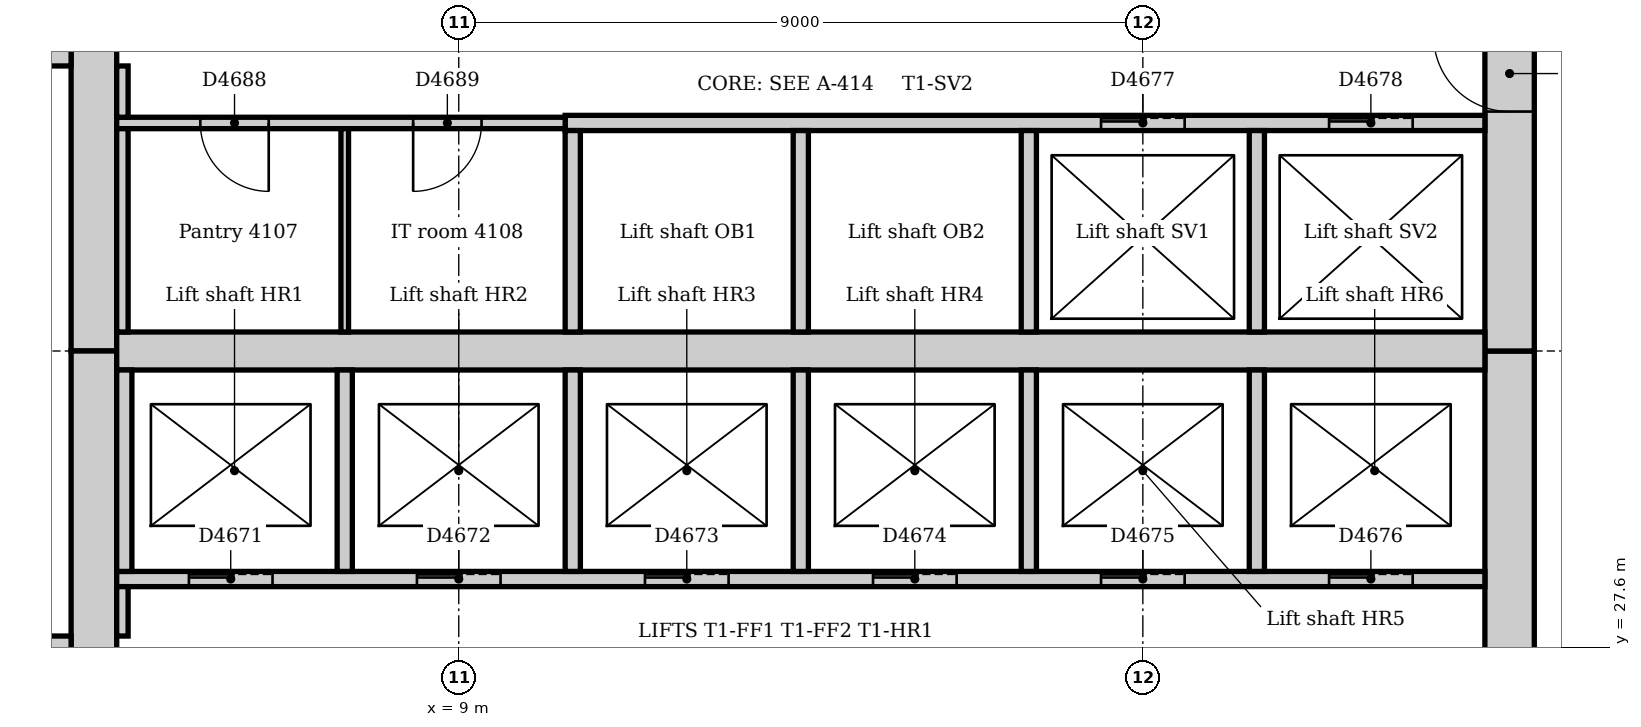
"""IFC4 building model, lengths in metres.
Left out: names, types, materials, properties, quantities, classifications, styles, units other than length and angle.
Written with IfcOpenShell. Run it as: python <this file> out.ifc"""

import sys

from ifc_helpers import new_model, si_unit, direction, frame, frame_2d, origin, place, context, subcontext, project, spatial, rectangle, extrude, element, fill, save


model = new_model("IFC4")
c1 = context("Model", 3, precision=1e-05, world=origin(), true_north=direction((0.0, 1.0)))
c2 = subcontext(c1, "Body", "Model", "MODEL_VIEW")
j1 = project(units=[si_unit("LENGTHUNIT", "METRE"), si_unit("PLANEANGLEUNIT", "RADIAN")], contexts=[c1])
p1 = place(None, origin())
s1 = spatial("IfcSite", under=j1, at=p1, CompositionType="ELEMENT")
p2 = place(p1, origin())
s2 = spatial("IfcBuilding", under=s1, at=p2, CompositionType="ELEMENT")
p3 = place(p2, frame((0.0, 0.0, 173.0)))
s3 = spatial("IfcBuildingStorey", under=s2, at=p3, CompositionType="ELEMENT", Elevation=173.0)
p4 = place(p3, frame((22.825, 21.0, 0.0), z_axis=(0.0, 0.0, 1.0), x_axis=(0.0, 1.0, 0.0)))
e1 = element("IfcWall", 1, at=p4, inside=s3, PredefinedType="SOLIDWALL", context=c2, shape_type="SweptSolid", body=[
    extrude(rectangle(XDim=10.5, YDim=0.65, at=frame_2d((5.25, 0.0))), origin(), (0.0, 0.0, 1.0), 4.0),
])
p5 = place(p4, frame((4.35, 0.0, 0.0)))
e2 = element("IfcOpeningElement", 2, at=p5, cuts=e1, PredefinedType="OPENING", context=c2, shape_type="SweptSolid", body=[
    extrude(rectangle(XDim=1.8, YDim=2.1, at=frame_2d((0.9, 1.05))), frame((0.0, 0.335, 0.0), z_axis=(0.0, -1.0, 0.0), x_axis=(1.0, 0.0, 0.0)), (0.0, 0.0, 1.0), 0.67),
])
p6 = place(p3, frame((22.825, 31.5, 0.0), z_axis=(0.0, 0.0, 1.0), x_axis=(0.0, 1.0, 0.0)))
e3 = element("IfcWall", 3, at=p6, inside=s3, PredefinedType="SOLIDWALL", context=c2, shape_type="SweptSolid", body=[
    extrude(rectangle(XDim=10.5, YDim=0.65, at=frame_2d((5.25, 0.0))), origin(), (0.0, 0.0, 1.0), 4.0),
])
p7 = place(p6, frame((3.15, 0.0, 0.0)))
e4 = element("IfcOpeningElement", 4, at=p7, cuts=e3, PredefinedType="OPENING", context=c2, shape_type="SweptSolid", body=[
    extrude(rectangle(XDim=1.0, YDim=2.1, at=frame_2d((0.5, 1.05))), frame((0.0, 0.335, 0.0), z_axis=(0.0, -1.0, 0.0), x_axis=(1.0, 0.0, 0.0)), (0.0, 0.0, 1.0), 0.67),
])
p8 = place(p6, frame((5.2, 0.0, 0.0)))
e5 = element("IfcOpeningElement", 5, at=p8, cuts=e3, PredefinedType="OPENING", context=c2, shape_type="SweptSolid", body=[
    extrude(rectangle(XDim=1.0, YDim=2.1, at=frame_2d((0.5, 1.05))), frame((0.0, 0.335, 0.0), z_axis=(0.0, -1.0, 0.0), x_axis=(1.0, 0.0, 0.0)), (0.0, 0.0, 1.0), 0.67),
])
p9 = place(p3, frame((4.2, 42.0, 0.0), z_axis=(0.0, 0.0, 1.0), x_axis=(0.0, -1.0, 0.0)))
e6 = element("IfcWall", 6, at=p9, inside=s3, PredefinedType="SOLIDWALL", context=c2, shape_type="SweptSolid", body=[
    extrude(rectangle(XDim=10.5, YDim=0.6, at=frame_2d((5.25, 0.0))), origin(), (0.0, 0.0, 1.0), 4.0),
])
p10 = place(p9, frame((5.3, 0.0, 0.0)))
e7 = element("IfcOpeningElement", 7, at=p10, cuts=e6, PredefinedType="OPENING", context=c2, shape_type="SweptSolid", body=[
    extrude(rectangle(XDim=1.0, YDim=2.1, at=frame_2d((0.5, 1.05))), frame((0.0, 0.31, 0.0), z_axis=(0.0, -1.0, 0.0), x_axis=(1.0, 0.0, 0.0)), (0.0, 0.0, 1.0), 0.62),
])
p11 = place(p3, frame((4.2, 31.5, 0.0), z_axis=(0.0, 0.0, 1.0), x_axis=(0.0, -1.0, 0.0)))
e8 = element("IfcWall", 8, at=p11, inside=s3, PredefinedType="SOLIDWALL", context=c2, shape_type="SweptSolid", body=[
    extrude(rectangle(XDim=10.5, YDim=0.6, at=frame_2d((5.25, 0.0))), origin(), (0.0, 0.0, 1.0), 4.0),
])
p12 = place(p11, frame((4.25, 0.0, 0.0)))
e9 = element("IfcOpeningElement", 9, at=p12, cuts=e8, PredefinedType="OPENING", context=c2, shape_type="SweptSolid", body=[
    extrude(rectangle(XDim=1.0, YDim=2.1, at=frame_2d((0.5, 1.05))), frame((0.0, 0.31, 0.0), z_axis=(0.0, -1.0, 0.0), x_axis=(1.0, 0.0, 0.0)), (0.0, 0.0, 1.0), 0.62),
])
p13 = place(p3, frame((4.5, 31.5, 0.0), z_axis=(0.0, 0.0, 1.0), x_axis=(1.0, 0.0, 0.0)))
e10 = element("IfcWall", 10, at=p13, inside=s3, PredefinedType="SOLIDWALL", context=c2, shape_type="SweptSolid", body=[
    extrude(rectangle(XDim=18.0, YDim=0.5, at=frame_2d((9.0, 0.0))), origin(), (0.0, 0.0, 1.0), 4.0),
])
p14 = place(p3, frame((3.9, 27.625, 0.0), z_axis=(0.0, 0.0, 1.0), x_axis=(-1.0, 0.0, 0.0)))
e11 = element("IfcWall", 11, at=p14, inside=s3, PredefinedType="SOLIDWALL", context=c2, shape_type="SweptSolid", body=[
    extrude(rectangle(XDim=3.54, YDim=0.25, at=frame_2d((1.77, 0.0))), origin(), (0.0, 0.0, 1.0), 4.0),
])
p15 = place(p14, frame((0.4, 0.0, 0.0)))
e12 = element("IfcOpeningElement", 12, at=p15, cuts=e11, PredefinedType="OPENING", context=c2, shape_type="SweptSolid", body=[
    extrude(rectangle(XDim=1.0, YDim=2.1, at=frame_2d((0.5, 1.05))), frame((0.0, 0.135, 0.0), z_axis=(0.0, -1.0, 0.0), x_axis=(1.0, 0.0, 0.0)), (0.0, 0.0, 1.0), 0.27),
])
p16 = place(p3, frame((0.36, 35.375, 0.0), z_axis=(0.0, 0.0, 1.0), x_axis=(1.0, 0.0, 0.0)))
e13 = element("IfcWall", 13, at=p16, inside=s3, PredefinedType="SOLIDWALL", context=c2, shape_type="SweptSolid", body=[
    extrude(rectangle(XDim=3.54, YDim=0.25, at=frame_2d((1.77, 0.0))), origin(), (0.0, 0.0, 1.0), 4.0),
])
p17 = place(p16, frame((2.14, 0.0, 0.0)))
e14 = element("IfcOpeningElement", 14, at=p17, cuts=e13, PredefinedType="OPENING", context=c2, shape_type="SweptSolid", body=[
    extrude(rectangle(XDim=1.0, YDim=2.1, at=frame_2d((0.5, 1.05))), frame((0.0, 0.135, 0.0), z_axis=(0.0, -1.0, 0.0), x_axis=(1.0, 0.0, 0.0)), (0.0, 0.0, 1.0), 0.27),
])
p18 = place(p3, frame((4.5, 28.5, 0.0), z_axis=(0.0, 0.0, 1.0), x_axis=(1.0, 0.0, 0.0)))
e15 = element("IfcWall", 15, at=p18, inside=s3, PredefinedType="PARTITIONING", context=c2, shape_type="SweptSolid", body=[
    extrude(rectangle(XDim=18.0, YDim=0.2, at=frame_2d((9.0, 0.0))), origin(), (0.0, 0.0, 1.0), 3.85),
])
p19 = place(p18, frame((0.95, 0.0, 0.0)))
e16 = element("IfcOpeningElement", 16, at=p19, cuts=e15, PredefinedType="OPENING", context=c2, shape_type="SweptSolid", body=[
    extrude(rectangle(XDim=1.1, YDim=2.1, at=frame_2d((0.55, 1.05))), frame((0.0, 0.11, 0.0), z_axis=(0.0, -1.0, 0.0), x_axis=(1.0, 0.0, 0.0)), (0.0, 0.0, 1.0), 0.22),
])
p20 = place(p18, frame((3.95, 0.0, 0.0)))
e17 = element("IfcOpeningElement", 17, at=p20, cuts=e15, PredefinedType="OPENING", context=c2, shape_type="SweptSolid", body=[
    extrude(rectangle(XDim=1.1, YDim=2.1, at=frame_2d((0.55, 1.05))), frame((0.0, 0.11, 0.0), z_axis=(0.0, -1.0, 0.0), x_axis=(1.0, 0.0, 0.0)), (0.0, 0.0, 1.0), 0.22),
])
p21 = place(p18, frame((6.95, 0.0, 0.0)))
e18 = element("IfcOpeningElement", 18, at=p21, cuts=e15, PredefinedType="OPENING", context=c2, shape_type="SweptSolid", body=[
    extrude(rectangle(XDim=1.1, YDim=2.1, at=frame_2d((0.55, 1.05))), frame((0.0, 0.11, 0.0), z_axis=(0.0, -1.0, 0.0), x_axis=(1.0, 0.0, 0.0)), (0.0, 0.0, 1.0), 0.22),
])
p22 = place(p18, frame((9.95, 0.0, 0.0)))
e19 = element("IfcOpeningElement", 19, at=p22, cuts=e15, PredefinedType="OPENING", context=c2, shape_type="SweptSolid", body=[
    extrude(rectangle(XDim=1.1, YDim=2.1, at=frame_2d((0.55, 1.05))), frame((0.0, 0.11, 0.0), z_axis=(0.0, -1.0, 0.0), x_axis=(1.0, 0.0, 0.0)), (0.0, 0.0, 1.0), 0.22),
])
p23 = place(p18, frame((12.95, 0.0, 0.0)))
e20 = element("IfcOpeningElement", 20, at=p23, cuts=e15, PredefinedType="OPENING", context=c2, shape_type="SweptSolid", body=[
    extrude(rectangle(XDim=1.1, YDim=2.1, at=frame_2d((0.55, 1.05))), frame((0.0, 0.11, 0.0), z_axis=(0.0, -1.0, 0.0), x_axis=(1.0, 0.0, 0.0)), (0.0, 0.0, 1.0), 0.22),
])
p24 = place(p18, frame((15.95, 0.0, 0.0)))
e21 = element("IfcOpeningElement", 21, at=p24, cuts=e15, PredefinedType="OPENING", context=c2, shape_type="SweptSolid", body=[
    extrude(rectangle(XDim=1.1, YDim=2.1, at=frame_2d((0.55, 1.05))), frame((0.0, 0.11, 0.0), z_axis=(0.0, -1.0, 0.0), x_axis=(1.0, 0.0, 0.0)), (0.0, 0.0, 1.0), 0.22),
])
p25 = place(p3, frame((10.4, 34.5, 0.0), z_axis=(0.0, 0.0, 1.0), x_axis=(1.0, 0.0, 0.0)))
e22 = element("IfcWall", 22, at=p25, inside=s3, PredefinedType="PARTITIONING", context=c2, shape_type="SweptSolid", body=[
    extrude(rectangle(XDim=12.1, YDim=0.2, at=frame_2d((6.05, 0.0))), origin(), (0.0, 0.0, 1.0), 3.85),
])
p26 = place(p25, frame((7.05, 0.0, 0.0)))
e23 = element("IfcOpeningElement", 23, at=p26, cuts=e22, PredefinedType="OPENING", context=c2, shape_type="SweptSolid", body=[
    extrude(rectangle(XDim=1.1, YDim=2.1, at=frame_2d((0.55, 1.05))), frame((0.0, 0.11, 0.0), z_axis=(0.0, -1.0, 0.0), x_axis=(1.0, 0.0, 0.0)), (0.0, 0.0, 1.0), 0.22),
])
p27 = place(p25, frame((10.05, 0.0, 0.0)))
e24 = element("IfcOpeningElement", 24, at=p27, cuts=e22, PredefinedType="OPENING", context=c2, shape_type="SweptSolid", body=[
    extrude(rectangle(XDim=1.1, YDim=2.1, at=frame_2d((0.55, 1.05))), frame((0.0, 0.11, 0.0), z_axis=(0.0, -1.0, 0.0), x_axis=(1.0, 0.0, 0.0)), (0.0, 0.0, 1.0), 0.22),
])
for number, where, z_axis, x_axis in (
    (25, (10.5, 28.6, 0.0), (0.0, 0.0, 1.0), (0.0, 1.0, 0.0)),
    (26, (10.5, 31.75, 0.0), (0.0, 0.0, 1.0), (0.0, 1.0, 0.0)),
    (27, (13.5, 28.6, 0.0), (0.0, 0.0, 1.0), (0.0, 1.0, 0.0)),
    (28, (13.5, 31.75, 0.0), (0.0, 0.0, 1.0), (0.0, 1.0, 0.0)),
    (29, (16.5, 28.6, 0.0), (0.0, 0.0, 1.0), (0.0, 1.0, 0.0)),
    (30, (16.5, 31.75, 0.0), (0.0, 0.0, 1.0), (0.0, 1.0, 0.0)),
    (31, (19.5, 28.6, 0.0), (0.0, 0.0, 1.0), (0.0, 1.0, 0.0)),
    (32, (19.5, 31.75, 0.0), (0.0, 0.0, 1.0), (0.0, 1.0, 0.0)),
    (33, (4.6, 28.6, 0.0), (0.0, 0.0, 1.0), (0.0, 1.0, 0.0)),
    (34, (7.5, 28.6, 0.0), (0.0, 0.0, 1.0), (0.0, 1.0, 0.0)),
):
    element("IfcWall", number, at=place(p3, frame(where, z_axis=z_axis, x_axis=x_axis)), inside=s3, PredefinedType="PARTITIONING", context=c2, shape_type="SweptSolid", body=[
        extrude(rectangle(XDim=2.65, YDim=0.2, at=frame_2d((1.325, 0.0))), origin(), (0.0, 0.0, 1.0), 3.85),
    ])
p28 = place(p3, frame((4.5, 34.5, 0.0), z_axis=(0.0, 0.0, 1.0), x_axis=(1.0, 0.0, 0.0)))
e35 = element("IfcWall", 35, at=p28, inside=s3, PredefinedType="PARTITIONING", context=c2, shape_type="SweptSolid", body=[
    extrude(rectangle(XDim=5.9, YDim=0.15, at=frame_2d((2.95, 0.0))), origin(), (0.0, 0.0, 1.0), 3.85),
])
p29 = place(p28, frame((1.1, 0.0, 0.0)))
e36 = element("IfcOpeningElement", 36, at=p29, cuts=e35, PredefinedType="OPENING", context=c2, shape_type="SweptSolid", body=[
    extrude(rectangle(XDim=0.9, YDim=2.1, at=frame_2d((0.45, 1.05))), frame((0.0, 0.085, 0.0), z_axis=(0.0, -1.0, 0.0), x_axis=(1.0, 0.0, 0.0)), (0.0, 0.0, 1.0), 0.17),
])
p30 = place(p28, frame((3.9, 0.0, 0.0)))
e37 = element("IfcOpeningElement", 37, at=p30, cuts=e35, PredefinedType="OPENING", context=c2, shape_type="SweptSolid", body=[
    extrude(rectangle(XDim=0.9, YDim=2.1, at=frame_2d((0.45, 1.05))), frame((0.0, 0.085, 0.0), z_axis=(0.0, -1.0, 0.0), x_axis=(1.0, 0.0, 0.0)), (0.0, 0.0, 1.0), 0.17),
])
p31 = place(p3, frame((4.575, 34.575, 0.0), z_axis=(0.0, 0.0, 1.0), x_axis=(0.0, 1.0, 0.0)))
e38 = element("IfcWall", 38, at=p31, inside=s3, PredefinedType="PARTITIONING", context=c2, shape_type="SweptSolid", body=[
    extrude(rectangle(XDim=0.675, YDim=0.15, at=frame_2d((0.338, 0.0))), origin(), (0.0, 0.0, 1.0), 3.85),
])
p32 = place(p3, frame((4.575, 31.75, 0.0), z_axis=(0.0, 0.0, 1.0), x_axis=(0.0, 1.0, 0.0)))
e39 = element("IfcWall", 39, at=p32, inside=s3, PredefinedType="PARTITIONING", context=c2, shape_type="SweptSolid", body=[
    extrude(rectangle(XDim=2.675, YDim=0.15, at=frame_2d((1.337, 0.0))), origin(), (0.0, 0.0, 1.0), 3.85),
])
p33 = place(p3, frame((4.575, 27.75, 0.0), z_axis=(0.0, 0.0, 1.0), x_axis=(0.0, 1.0, 0.0)))
e40 = element("IfcWall", 40, at=p33, inside=s3, PredefinedType="PARTITIONING", context=c2, shape_type="SweptSolid", body=[
    extrude(rectangle(XDim=0.65, YDim=0.15, at=frame_2d((0.325, 0.0))), origin(), (0.0, 0.0, 1.0), 3.85),
])
p34 = place(p3, frame((7.5, 31.75, 0.0), z_axis=(0.0, 0.0, 1.0), x_axis=(0.0, 1.0, 0.0)))
e41 = element("IfcWall", 41, at=p34, inside=s3, PredefinedType="PARTITIONING", context=c2, shape_type="SweptSolid", body=[
    extrude(rectangle(XDim=2.675, YDim=0.1, at=frame_2d((1.337, 0.0))), origin(), (0.0, 0.0, 1.0), 3.85),
])
p35 = place(p19, origin())
e42 = element("IfcDoor", 42, at=p35, inside=s3, OperationType="SLIDING_TO_LEFT", PredefinedType="DOOR", context=c2, shape_type="SweptSolid", body=[
    extrude(rectangle(XDim=1.1, YDim=2.1, at=frame_2d((0.55, 1.05))), frame((0.0, 0.025, 0.0), z_axis=(0.0, -1.0, 0.0), x_axis=(1.0, 0.0, 0.0)), (0.0, 0.0, 1.0), 0.05),
])
fill(e16, e42)
p36 = place(p20, origin())
e43 = element("IfcDoor", 43, at=p36, inside=s3, OperationType="SLIDING_TO_LEFT", PredefinedType="DOOR", context=c2, shape_type="SweptSolid", body=[
    extrude(rectangle(XDim=1.1, YDim=2.1, at=frame_2d((0.55, 1.05))), frame((0.0, 0.025, 0.0), z_axis=(0.0, -1.0, 0.0), x_axis=(1.0, 0.0, 0.0)), (0.0, 0.0, 1.0), 0.05),
])
fill(e17, e43)
p37 = place(p21, origin())
e44 = element("IfcDoor", 44, at=p37, inside=s3, OperationType="SLIDING_TO_LEFT", PredefinedType="DOOR", context=c2, shape_type="SweptSolid", body=[
    extrude(rectangle(XDim=1.1, YDim=2.1, at=frame_2d((0.55, 1.05))), frame((0.0, 0.025, 0.0), z_axis=(0.0, -1.0, 0.0), x_axis=(1.0, 0.0, 0.0)), (0.0, 0.0, 1.0), 0.05),
])
fill(e18, e44)
p38 = place(p22, origin())
e45 = element("IfcDoor", 45, at=p38, inside=s3, OperationType="SLIDING_TO_LEFT", PredefinedType="DOOR", context=c2, shape_type="SweptSolid", body=[
    extrude(rectangle(XDim=1.1, YDim=2.1, at=frame_2d((0.55, 1.05))), frame((0.0, 0.025, 0.0), z_axis=(0.0, -1.0, 0.0), x_axis=(1.0, 0.0, 0.0)), (0.0, 0.0, 1.0), 0.05),
])
fill(e19, e45)
p39 = place(p23, origin())
e46 = element("IfcDoor", 46, at=p39, inside=s3, OperationType="SLIDING_TO_LEFT", PredefinedType="DOOR", context=c2, shape_type="SweptSolid", body=[
    extrude(rectangle(XDim=1.1, YDim=2.1, at=frame_2d((0.55, 1.05))), frame((0.0, 0.025, 0.0), z_axis=(0.0, -1.0, 0.0), x_axis=(1.0, 0.0, 0.0)), (0.0, 0.0, 1.0), 0.05),
])
fill(e20, e46)
p40 = place(p24, origin())
e47 = element("IfcDoor", 47, at=p40, inside=s3, OperationType="SLIDING_TO_LEFT", PredefinedType="DOOR", context=c2, shape_type="SweptSolid", body=[
    extrude(rectangle(XDim=1.1, YDim=2.1, at=frame_2d((0.55, 1.05))), frame((0.0, 0.025, 0.0), z_axis=(0.0, -1.0, 0.0), x_axis=(1.0, 0.0, 0.0)), (0.0, 0.0, 1.0), 0.05),
])
fill(e21, e47)
p41 = place(p26, origin())
e48 = element("IfcDoor", 48, at=p41, inside=s3, OperationType="SLIDING_TO_LEFT", PredefinedType="DOOR", context=c2, shape_type="SweptSolid", body=[
    extrude(rectangle(XDim=1.1, YDim=2.1, at=frame_2d((0.55, 1.05))), frame((0.0, 0.025, 0.0), z_axis=(0.0, -1.0, 0.0), x_axis=(1.0, 0.0, 0.0)), (0.0, 0.0, 1.0), 0.05),
])
fill(e23, e48)
p42 = place(p27, origin())
e49 = element("IfcDoor", 49, at=p42, inside=s3, OperationType="SLIDING_TO_LEFT", PredefinedType="DOOR", context=c2, shape_type="SweptSolid", body=[
    extrude(rectangle(XDim=1.1, YDim=2.1, at=frame_2d((0.55, 1.05))), frame((0.0, 0.025, 0.0), z_axis=(0.0, -1.0, 0.0), x_axis=(1.0, 0.0, 0.0)), (0.0, 0.0, 1.0), 0.05),
])
fill(e24, e49)
p43 = place(p7, origin())
e50 = element("IfcDoor", 50, at=p43, inside=s3, OperationType="SINGLE_SWING_RIGHT", PredefinedType="DOOR", context=c2, shape_type="SweptSolid", body=[
    extrude(rectangle(XDim=1.0, YDim=2.1, at=frame_2d((0.5, 1.05))), frame((0.0, 0.025, 0.0), z_axis=(0.0, -1.0, 0.0), x_axis=(1.0, 0.0, 0.0)), (0.0, 0.0, 1.0), 0.05),
])
fill(e4, e50)
p44 = place(p29, frame((0.9, 0.0, 0.0), z_axis=(0.0, 0.0, 1.0), x_axis=(-1.0, 0.0, 0.0)))
e51 = element("IfcDoor", 51, at=p44, inside=s3, OperationType="SINGLE_SWING_LEFT", PredefinedType="DOOR", context=c2, shape_type="SweptSolid", body=[
    extrude(rectangle(XDim=0.9, YDim=2.1, at=frame_2d((0.45, 1.05))), frame((0.0, 0.025, 0.0), z_axis=(0.0, -1.0, 0.0), x_axis=(1.0, 0.0, 0.0)), (0.0, 0.0, 1.0), 0.05),
])
fill(e36, e51)
p45 = place(p30, frame((0.9, 0.0, 0.0), z_axis=(0.0, 0.0, 1.0), x_axis=(-1.0, 0.0, 0.0)))
e52 = element("IfcDoor", 52, at=p45, inside=s3, OperationType="SINGLE_SWING_RIGHT", PredefinedType="DOOR", context=c2, shape_type="SweptSolid", body=[
    extrude(rectangle(XDim=0.9, YDim=2.1, at=frame_2d((0.45, 1.05))), frame((0.0, 0.025, 0.0), z_axis=(0.0, -1.0, 0.0), x_axis=(1.0, 0.0, 0.0)), (0.0, 0.0, 1.0), 0.05),
])
fill(e37, e52)
save(model, sys.argv[1])
